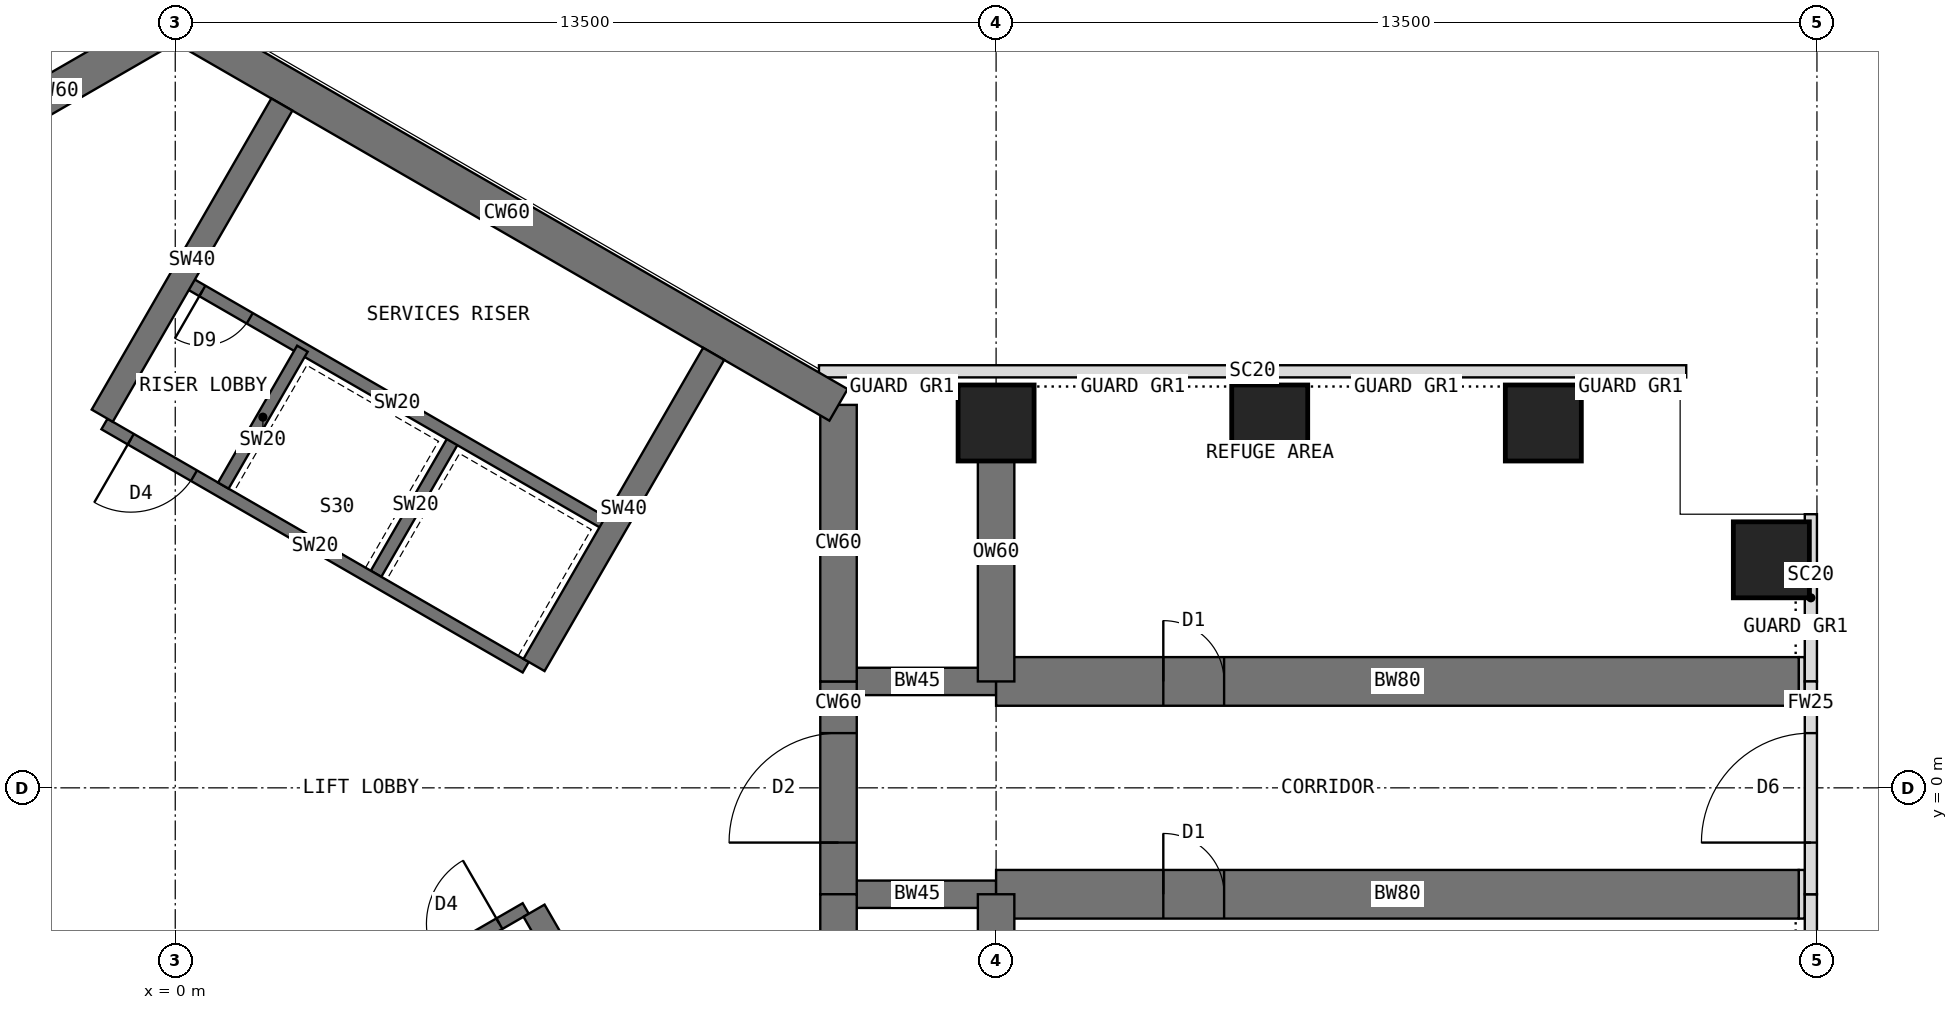
"""IFC4 building model, lengths in metres.
Left out: names, types, materials, properties, quantities, classifications, styles, units other than length and angle.
Written with IfcOpenShell. Run it as: python <this file> out.ifc"""

import sys

from ifc_helpers import new_model, si_unit, direction, frame, frame_2d, origin, origin_2d, place, context, subcontext, project, spatial, rectangle, extrude, element, fill, save


model = new_model("IFC4")
c1 = context("Model", 3, precision=1e-05, world=origin(), true_north=direction((0.0, 1.0)))
c2 = subcontext(c1, "Body", "Model", "MODEL_VIEW")
j1 = project(units=[si_unit("LENGTHUNIT", "METRE"), si_unit("PLANEANGLEUNIT", "RADIAN")], contexts=[c1])
p1 = place(None, origin())
s1 = spatial("IfcSite", under=j1, at=p1, CompositionType="ELEMENT")
p2 = place(p1, origin())
s2 = spatial("IfcBuilding", under=s1, at=p2, CompositionType="ELEMENT")
p3 = place(p2, frame((0.0, 0.0, 165.5)))
s3 = spatial("IfcBuildingStorey", under=s2, at=p3, CompositionType="ELEMENT", Elevation=165.5)
p4 = place(p3, frame((10.908, -6.298, 0.0), z_axis=(0.0, 0.0, 1.0), x_axis=(0.0, 1.0, 0.0)))
e1 = element("IfcWall", 1, at=p4, inside=s3, PredefinedType="SHEAR", context=c2, shape_type="SweptSolid", body=[
    extrude(rectangle(XDim=4.548, YDim=0.6, at=frame_2d((2.274, 0.0))), origin(), (0.0, 0.0, 1.0), 5.0),
])
p5 = place(p3, frame((10.908, -1.75, 0.0), z_axis=(0.0, 0.0, 1.0), x_axis=(0.0, 1.0, 0.0)))
e2 = element("IfcWall", 2, at=p5, inside=s3, PredefinedType="SHEAR", context=c2, shape_type="SweptSolid", body=[
    extrude(rectangle(XDim=3.5, YDim=0.6, at=frame_2d((1.75, 0.0))), origin(), (0.0, 0.0, 1.0), 5.0),
])
p6 = place(p5, frame((0.85, 0.0, 0.0)))
e3 = element("IfcOpeningElement", 3, at=p6, cuts=e2, PredefinedType="OPENING", context=c2, shape_type="SweptSolid", body=[
    extrude(rectangle(XDim=1.8, YDim=2.1, at=frame_2d((0.9, 1.05))), frame((0.0, 0.31, 0.0), z_axis=(0.0, -1.0, 0.0), x_axis=(1.0, 0.0, 0.0)), (0.0, 0.0, 1.0), 0.62),
])
p7 = place(p3, frame((10.908, 1.75, 0.0), z_axis=(0.0, 0.0, 1.0), x_axis=(0.0, 1.0, 0.0)))
e4 = element("IfcWall", 4, at=p7, inside=s3, PredefinedType="SHEAR", context=c2, shape_type="SweptSolid", body=[
    extrude(rectangle(XDim=4.548, YDim=0.6, at=frame_2d((2.274, 0.0))), origin(), (0.0, 0.0, 1.0), 5.0),
])
p8 = place(p3, frame((10.908, 6.298, 0.0), z_axis=(0.0, 0.0, 1.0), x_axis=(-0.866021940709, 0.500005998175, 0.0)))
e5 = element("IfcWall", 5, at=p8, inside=s3, PredefinedType="SHEAR", context=c2, shape_type="SweptSolid", body=[
    extrude(rectangle(XDim=12.596, YDim=0.6, at=frame_2d((6.298, 0.0))), origin(), (0.0, 0.0, 1.0), 5.0),
])
p9 = place(p3, frame((0.0, 12.596, 0.0), z_axis=(0.0, 0.0, 1.0), x_axis=(-0.866011268655, -0.500024481964, 0.0)))
e6 = element("IfcWall", 6, at=p9, inside=s3, PredefinedType="SHEAR", context=c2, shape_type="SweptSolid", body=[
    extrude(rectangle(XDim=4.548, YDim=0.6, at=frame_2d((2.274, 0.0))), origin(), (0.0, 0.0, 1.0), 5.0),
])
p10 = place(p3, frame((10.908, 1.75, 0.0), z_axis=(0.0, 0.0, 1.0), x_axis=(1.0, 0.0, 0.0)))
e7 = element("IfcWall", 7, at=p10, inside=s3, PredefinedType="SHEAR", context=c2, shape_type="SweptSolid", body=[
    extrude(rectangle(XDim=2.592, YDim=0.45, at=frame_2d((1.296, 0.0))), origin(), (0.0, 0.0, 1.0), 5.0),
])
p11 = place(p3, frame((13.5, 1.75, 0.0), z_axis=(0.0, 0.0, 1.0), x_axis=(1.0, 0.0, 0.0)))
e8 = element("IfcWall", 8, at=p11, inside=s3, PredefinedType="SHEAR", context=c2, shape_type="SweptSolid", body=[
    extrude(rectangle(XDim=13.2, YDim=0.8, at=frame_2d((6.6, 0.0))), origin(), (0.0, 0.0, 1.0), 5.0),
])
p12 = place(p11, frame((2.75, 0.0, 0.0)))
e9 = element("IfcOpeningElement", 9, at=p12, cuts=e8, PredefinedType="OPENING", context=c2, shape_type="SweptSolid", body=[
    extrude(rectangle(XDim=1.0, YDim=2.1, at=frame_2d((0.5, 1.05))), frame((0.0, 0.41, 0.0), z_axis=(0.0, -1.0, 0.0), x_axis=(1.0, 0.0, 0.0)), (0.0, 0.0, 1.0), 0.82),
])
p13 = place(p3, frame((10.908, -1.75, 0.0), z_axis=(0.0, 0.0, 1.0), x_axis=(1.0, 0.0, 0.0)))
e10 = element("IfcWall", 10, at=p13, inside=s3, PredefinedType="SHEAR", context=c2, shape_type="SweptSolid", body=[
    extrude(rectangle(XDim=2.592, YDim=0.45, at=frame_2d((1.296, 0.0))), origin(), (0.0, 0.0, 1.0), 5.0),
])
p14 = place(p3, frame((13.5, -1.75, 0.0), z_axis=(0.0, 0.0, 1.0), x_axis=(1.0, 0.0, 0.0)))
e11 = element("IfcWall", 11, at=p14, inside=s3, PredefinedType="SHEAR", context=c2, shape_type="SweptSolid", body=[
    extrude(rectangle(XDim=13.2, YDim=0.8, at=frame_2d((6.6, 0.0))), origin(), (0.0, 0.0, 1.0), 5.0),
])
p15 = place(p14, frame((2.75, 0.0, 0.0)))
e12 = element("IfcOpeningElement", 12, at=p15, cuts=e11, PredefinedType="OPENING", context=c2, shape_type="SweptSolid", body=[
    extrude(rectangle(XDim=1.0, YDim=2.1, at=frame_2d((0.5, 1.05))), frame((0.0, 0.41, 0.0), z_axis=(0.0, -1.0, 0.0), x_axis=(1.0, 0.0, 0.0)), (0.0, 0.0, 1.0), 0.82),
])
for number, where, z_axis, x_axis in (
    (13, (13.5, 6.0, 0.0), (0.0, 0.0, 1.0), (1.0, 0.0, 0.0)),
    (14, (18.0, 6.0, 0.0), (0.0, 0.0, 1.0), (1.0, 0.0, 0.0)),
    (15, (22.5, 6.0, 0.0), (0.0, 0.0, 1.0), (1.0, 0.0, 0.0)),
    (16, (26.25, 3.75, 0.0), (0.0, 0.0, 1.0), (1.0, 0.0, 0.0)),
):
    element("IfcColumn", number, at=place(p3, frame(where, z_axis=z_axis, x_axis=x_axis)), inside=s3, PredefinedType="COLUMN", context=c2, shape_type="SweptSolid", body=[
        extrude(rectangle(XDim=1.25, YDim=1.25, at=origin_2d()), origin(), (0.0, 0.0, 1.0), 5.0),
    ])
for number, where, z_axis, x_axis in (
    (17, (13.5, 1.75, 0.0), (0.0, 0.0, 1.0), (0.0, 1.0, 0.0)),
    (18, (13.5, -1.75, 0.0), (0.0, 0.0, 1.0), (0.0, -1.0, 0.0)),
):
    element("IfcWall", number, at=place(p3, frame(where, z_axis=z_axis, x_axis=x_axis)), inside=s3, PredefinedType="SHEAR", context=c2, shape_type="SweptSolid", body=[
        extrude(rectangle(XDim=4.25, YDim=0.6, at=frame_2d((2.125, 0.0))), origin(), (0.0, 0.0, 1.0), 5.0),
    ])
p16 = place(p3, frame((10.587, 6.85, 0.0), z_axis=(0.0, 0.0, 1.0), x_axis=(1.0, 0.0, 0.0)))
e19 = element("IfcWall", 19, at=p16, inside=s3, PredefinedType="USERDEFINED", context=c2, shape_type="SweptSolid", body=[
    extrude(rectangle(XDim=14.263, YDim=0.2, at=frame_2d((7.131, 0.0))), origin(), (0.0, 0.0, 1.0), 4.8),
])
p17 = place(p3, frame((26.9, -4.5, 0.0), z_axis=(0.0, 0.0, 1.0), x_axis=(0.0, 1.0, 0.0)))
e20 = element("IfcWall", 20, at=p17, inside=s3, PredefinedType="USERDEFINED", context=c2, shape_type="SweptSolid", body=[
    extrude(rectangle(XDim=2.75, YDim=0.2, at=frame_2d((1.375, 0.0))), origin(), (0.0, 0.0, 1.0), 4.8),
])
p18 = place(p3, frame((26.9, -1.75, 0.0), z_axis=(0.0, 0.0, 1.0), x_axis=(0.0, 1.0, 0.0)))
e21 = element("IfcWall", 21, at=p18, inside=s3, PredefinedType="STANDARD", context=c2, shape_type="SweptSolid", body=[
    extrude(rectangle(XDim=3.5, YDim=0.2, at=frame_2d((1.75, 0.0))), origin(), (0.0, 0.0, 1.0), 4.8),
])
p19 = place(p18, frame((0.85, 0.0, 0.0)))
e22 = element("IfcOpeningElement", 22, at=p19, cuts=e21, PredefinedType="OPENING", context=c2, shape_type="SweptSolid", body=[
    extrude(rectangle(XDim=1.8, YDim=2.4, at=frame_2d((0.9, 1.2))), frame((0.0, 0.11, 0.0), z_axis=(0.0, -1.0, 0.0), x_axis=(1.0, 0.0, 0.0)), (0.0, 0.0, 1.0), 0.22),
])
p20 = place(p3, frame((26.9, 1.75, 0.0), z_axis=(0.0, 0.0, 1.0), x_axis=(0.0, 1.0, 0.0)))
e23 = element("IfcWall", 23, at=p20, inside=s3, PredefinedType="USERDEFINED", context=c2, shape_type="SweptSolid", body=[
    extrude(rectangle(XDim=2.75, YDim=0.2, at=frame_2d((1.375, 0.0))), origin(), (0.0, 0.0, 1.0), 4.8),
])
for number, where, z_axis, x_axis in (
    (24, (26.7, 1.75, 0.0), (0.0, 0.0, 1.0), (1.0, 0.0, 0.0)),
    (25, (26.7, -1.75, 0.0), (0.0, 0.0, 1.0), (1.0, 0.0, 0.0)),
):
    element("IfcWall", number, at=place(p3, frame(where, z_axis=z_axis, x_axis=x_axis)), inside=s3, PredefinedType="PARTITIONING", context=c2, shape_type="SweptSolid", body=[
        extrude(rectangle(XDim=0.1, YDim=0.8, at=frame_2d((0.05, 0.0))), origin(), (0.0, 0.0, 1.0), 4.8),
    ])
p21 = place(p3, frame((5.764, 1.984, 0.0), z_axis=(0.0, 0.0, 1.0), x_axis=(-0.866026010844, 0.49999894854, 0.0)))
e26 = element("IfcWall", 26, at=p21, inside=s3, PredefinedType="SHEAR", context=c2, shape_type="SweptSolid", body=[
    extrude(rectangle(XDim=8.0, YDim=0.2, at=frame_2d((4.0, 0.0))), origin(), (0.0, 0.0, 1.0), 5.0),
])
p22 = place(p21, frame((6.3, 0.0, 0.0)))
e27 = element("IfcOpeningElement", 27, at=p22, cuts=e26, PredefinedType="OPENING", context=c2, shape_type="SweptSolid", body=[
    extrude(rectangle(XDim=1.2, YDim=2.1, at=frame_2d((0.6, 1.05))), frame((0.0, 0.11, 0.0), z_axis=(0.0, -1.0, 0.0), x_axis=(1.0, 0.0, 0.0)), (0.0, 0.0, 1.0), 0.22),
])
for number, where, z_axis, x_axis in (
    (28, (3.303, 3.52, 0.0), (0.0, 0.0, 1.0), (0.5, 0.866, 0.0)),
    (29, (0.791, 4.97, 0.0), (0.0, 0.0, 1.0), (0.5, 0.866, 0.0)),
):
    element("IfcWall", number, at=place(p3, frame(where, z_axis=z_axis, x_axis=x_axis)), inside=s3, PredefinedType="SHEAR", context=c2, shape_type="SweptSolid", body=[
        extrude(rectangle(XDim=2.6, YDim=0.2, at=frame_2d((1.3, 0.0))), origin(), (0.0, 0.0, 1.0), 5.0),
    ])
p23 = place(p3, frame((7.114, 4.322, 0.0), z_axis=(0.0, 0.0, 1.0), x_axis=(-0.866026010844, 0.49999894854, 0.0)))
e30 = element("IfcWall", 30, at=p23, inside=s3, PredefinedType="SHEAR", context=c2, shape_type="SweptSolid", body=[
    extrude(rectangle(XDim=8.0, YDim=0.2, at=frame_2d((4.0, 0.0))), origin(), (0.0, 0.0, 1.0), 5.0),
])
p24 = place(p23, frame((6.8, 0.0, 0.0)))
e31 = element("IfcOpeningElement", 31, at=p24, cuts=e30, PredefinedType="OPENING", context=c2, shape_type="SweptSolid", body=[
    extrude(rectangle(XDim=0.9, YDim=2.1, at=frame_2d((0.45, 1.05))), frame((0.0, 0.11, 0.0), z_axis=(0.0, -1.0, 0.0), x_axis=(1.0, 0.0, 0.0)), (0.0, 0.0, 1.0), 0.22),
])
p25 = place(p3, frame((-1.201, 6.12, 0.0), z_axis=(0.0, 0.0, 1.0), x_axis=(0.49999668571, 0.866027317282, 0.0)))
e32 = element("IfcWall", 32, at=p25, inside=s3, PredefinedType="SHEAR", context=c2, shape_type="SweptSolid", body=[
    extrude(rectangle(XDim=5.908, YDim=0.4, at=frame_2d((2.954, 0.0))), origin(), (0.0, 0.0, 1.0), 5.0),
])
p26 = place(p3, frame((5.901, 2.02, 0.0), z_axis=(0.0, 0.0, 1.0), x_axis=(0.500027676417, 0.866009424208, 0.0)))
e33 = element("IfcWall", 33, at=p26, inside=s3, PredefinedType="SHEAR", context=c2, shape_type="SweptSolid", body=[
    extrude(rectangle(XDim=5.908, YDim=0.4, at=frame_2d((2.954, 0.0))), origin(), (0.0, 0.0, 1.0), 5.0),
])
p27 = place(p3, frame((-1.164, -5.984, 0.0), z_axis=(0.0, 0.0, 1.0), x_axis=(0.866026010844, 0.49999894854, 0.0)))
e34 = element("IfcWall", 34, at=p27, inside=s3, PredefinedType="SHEAR", context=c2, shape_type="SweptSolid", body=[
    extrude(rectangle(XDim=8.0, YDim=0.2, at=frame_2d((4.0, 0.0))), origin(), (0.0, 0.0, 1.0), 5.0),
])
p28 = place(p27, frame((6.3, 0.0, 0.0)))
e35 = element("IfcOpeningElement", 35, at=p28, cuts=e34, PredefinedType="OPENING", context=c2, shape_type="SweptSolid", body=[
    extrude(rectangle(XDim=1.2, YDim=2.1, at=frame_2d((0.6, 1.05))), frame((0.0, 0.11, 0.0), z_axis=(0.0, -1.0, 0.0), x_axis=(1.0, 0.0, 0.0)), (0.0, 0.0, 1.0), 0.22),
])
p29 = place(p27, frame((0.9, 0.0, 0.0)))
e36 = element("IfcOpeningElement", 36, at=p29, cuts=e34, PredefinedType="OPENING", context=c2, shape_type="SweptSolid", body=[
    extrude(rectangle(XDim=1.1, YDim=2.2, at=frame_2d((0.55, 1.1))), frame((0.0, 0.11, 0.0), z_axis=(0.0, -1.0, 0.0), x_axis=(1.0, 0.0, 0.0)), (0.0, 0.0, 1.0), 0.22),
])
p30 = place(p27, frame((3.8, 0.0, 0.0)))
e37 = element("IfcOpeningElement", 37, at=p30, cuts=e34, PredefinedType="OPENING", context=c2, shape_type="SweptSolid", body=[
    extrude(rectangle(XDim=1.1, YDim=2.2, at=frame_2d((0.55, 1.1))), frame((0.0, 0.11, 0.0), z_axis=(0.0, -1.0, 0.0), x_axis=(1.0, 0.0, 0.0)), (0.0, 0.0, 1.0), 0.22),
])
p31 = place(p3, frame((5.901, -2.02, 0.0), z_axis=(0.0, 0.0, 1.0), x_axis=(0.500027676417, -0.866009424208, 0.0)))
e38 = element("IfcWall", 38, at=p31, inside=s3, PredefinedType="SHEAR", context=c2, shape_type="SweptSolid", body=[
    extrude(rectangle(XDim=5.908, YDim=0.4, at=frame_2d((2.954, 0.0))), origin(), (0.0, 0.0, 1.0), 5.0),
])
p32 = place(p19, origin())
e39 = element("IfcDoor", 39, at=p32, inside=s3, OperationType="DOUBLE_DOOR_DOUBLE_SWING", PredefinedType="DOOR", context=c2, shape_type="SweptSolid", body=[
    extrude(rectangle(XDim=1.8, YDim=2.4, at=frame_2d((0.9, 1.2))), frame((0.0, 0.025, 0.0), z_axis=(0.0, -1.0, 0.0), x_axis=(1.0, 0.0, 0.0)), (0.0, 0.0, 1.0), 0.05),
])
fill(e22, e39)
p33 = place(p22, origin())
e40 = element("IfcDoor", 40, at=p33, inside=s3, OperationType="SINGLE_SWING_RIGHT", PredefinedType="DOOR", context=c2, shape_type="SweptSolid", body=[
    extrude(rectangle(XDim=1.2, YDim=2.1, at=frame_2d((0.6, 1.05))), frame((0.0, 0.025, 0.0), z_axis=(0.0, -1.0, 0.0), x_axis=(1.0, 0.0, 0.0)), (0.0, 0.0, 1.0), 0.05),
])
fill(e27, e40)
p34 = place(p24, origin())
e41 = element("IfcDoor", 41, at=p34, inside=s3, OperationType="SINGLE_SWING_RIGHT", PredefinedType="DOOR", context=c2, shape_type="SweptSolid", body=[
    extrude(rectangle(XDim=0.9, YDim=2.1, at=frame_2d((0.45, 1.05))), frame((0.0, 0.025, 0.0), z_axis=(0.0, -1.0, 0.0), x_axis=(1.0, 0.0, 0.0)), (0.0, 0.0, 1.0), 0.05),
])
fill(e31, e41)
p35 = place(p28, origin())
e42 = element("IfcDoor", 42, at=p35, inside=s3, OperationType="SINGLE_SWING_RIGHT", PredefinedType="DOOR", context=c2, shape_type="SweptSolid", body=[
    extrude(rectangle(XDim=1.2, YDim=2.1, at=frame_2d((0.6, 1.05))), frame((0.0, 0.025, 0.0), z_axis=(0.0, -1.0, 0.0), x_axis=(1.0, 0.0, 0.0)), (0.0, 0.0, 1.0), 0.05),
])
fill(e35, e42)
p36 = place(p6, origin())
e43 = element("IfcDoor", 43, at=p36, inside=s3, OperationType="DOUBLE_DOOR_DOUBLE_SWING", PredefinedType="DOOR", context=c2, shape_type="SweptSolid", body=[
    extrude(rectangle(XDim=1.72, YDim=2.06, at=frame_2d((0.9, 1.03))), frame((0.0, 0.025, 0.0), z_axis=(0.0, -1.0, 0.0), x_axis=(1.0, 0.0, 0.0)), (0.0, 0.0, 1.0), 0.05),
    extrude(rectangle(XDim=0.04, YDim=2.1, at=frame_2d((0.02, 1.05))), frame((0.0, 0.3, 0.0), z_axis=(0.0, -1.0, 0.0), x_axis=(1.0, 0.0, 0.0)), (0.0, 0.0, 1.0), 0.6),
    extrude(rectangle(XDim=0.04, YDim=2.1, at=frame_2d((1.78, 1.05))), frame((0.0, 0.3, 0.0), z_axis=(0.0, -1.0, 0.0), x_axis=(1.0, 0.0, 0.0)), (0.0, 0.0, 1.0), 0.6),
    extrude(rectangle(XDim=1.72, YDim=0.04, at=frame_2d((0.9, 2.08))), frame((0.0, 0.3, 0.0), z_axis=(0.0, -1.0, 0.0), x_axis=(1.0, 0.0, 0.0)), (0.0, 0.0, 1.0), 0.6),
])
fill(e3, e43)
p37 = place(p12, origin())
e44 = element("IfcDoor", 44, at=p37, inside=s3, OperationType="SINGLE_SWING_LEFT", PredefinedType="DOOR", context=c2, shape_type="SweptSolid", body=[
    extrude(rectangle(XDim=0.92, YDim=2.06, at=frame_2d((0.5, 1.03))), frame((0.0, 0.025, 0.0), z_axis=(0.0, -1.0, 0.0), x_axis=(1.0, 0.0, 0.0)), (0.0, 0.0, 1.0), 0.05),
    extrude(rectangle(XDim=0.04, YDim=2.1, at=frame_2d((0.02, 1.05))), frame((0.0, 0.4, 0.0), z_axis=(0.0, -1.0, 0.0), x_axis=(1.0, 0.0, 0.0)), (0.0, 0.0, 1.0), 0.8),
    extrude(rectangle(XDim=0.04, YDim=2.1, at=frame_2d((0.98, 1.05))), frame((0.0, 0.4, 0.0), z_axis=(0.0, -1.0, 0.0), x_axis=(1.0, 0.0, 0.0)), (0.0, 0.0, 1.0), 0.8),
    extrude(rectangle(XDim=0.92, YDim=0.04, at=frame_2d((0.5, 2.08))), frame((0.0, 0.4, 0.0), z_axis=(0.0, -1.0, 0.0), x_axis=(1.0, 0.0, 0.0)), (0.0, 0.0, 1.0), 0.8),
])
fill(e9, e44)
p38 = place(p15, origin())
e45 = element("IfcDoor", 45, at=p38, inside=s3, OperationType="SINGLE_SWING_LEFT", PredefinedType="DOOR", context=c2, shape_type="SweptSolid", body=[
    extrude(rectangle(XDim=0.92, YDim=2.06, at=frame_2d((0.5, 1.03))), frame((0.0, 0.025, 0.0), z_axis=(0.0, -1.0, 0.0), x_axis=(1.0, 0.0, 0.0)), (0.0, 0.0, 1.0), 0.05),
    extrude(rectangle(XDim=0.04, YDim=2.1, at=frame_2d((0.02, 1.05))), frame((0.0, 0.4, 0.0), z_axis=(0.0, -1.0, 0.0), x_axis=(1.0, 0.0, 0.0)), (0.0, 0.0, 1.0), 0.8),
    extrude(rectangle(XDim=0.04, YDim=2.1, at=frame_2d((0.98, 1.05))), frame((0.0, 0.4, 0.0), z_axis=(0.0, -1.0, 0.0), x_axis=(1.0, 0.0, 0.0)), (0.0, 0.0, 1.0), 0.8),
    extrude(rectangle(XDim=0.92, YDim=0.04, at=frame_2d((0.5, 2.08))), frame((0.0, 0.4, 0.0), z_axis=(0.0, -1.0, 0.0), x_axis=(1.0, 0.0, 0.0)), (0.0, 0.0, 1.0), 0.8),
])
fill(e12, e45)
save(model, sys.argv[1])
